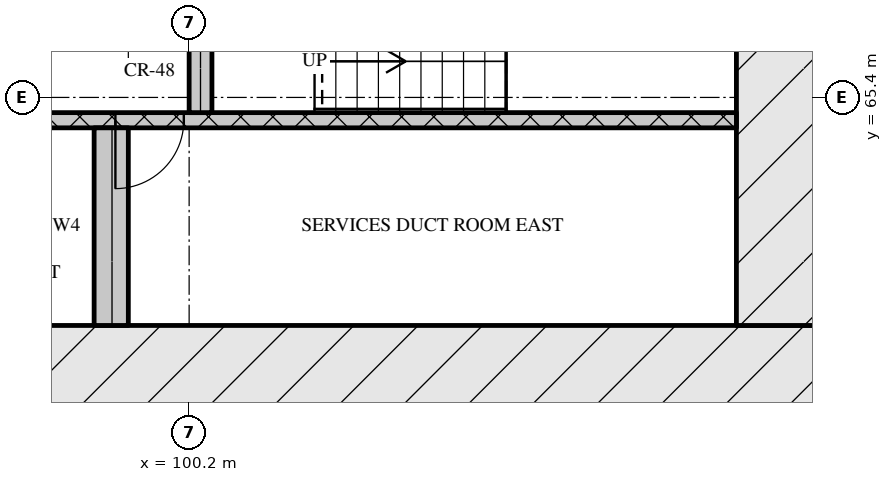
"""IFC4 building model, lengths in metres.
Left out: names, types, materials, properties, quantities, classifications, styles, units other than length and angle.
Written with IfcOpenShell. Run it as: python <this file> out.ifc"""

import sys

from ifc_helpers import new_model, si_unit, direction, frame, frame_2d, origin, place, context, subcontext, project, spatial, rectangle, extrude, element, fill, save


model = new_model("IFC4")
c1 = context("Model", 3, precision=1e-05, world=origin(), true_north=direction((0.0, 1.0)))
c2 = subcontext(c1, "Body", "Model", "MODEL_VIEW")
j1 = project(units=[si_unit("LENGTHUNIT", "METRE"), si_unit("PLANEANGLEUNIT", "RADIAN")], contexts=[c1])
p1 = place(None, origin())
s1 = spatial("IfcSite", under=j1, at=p1, CompositionType="ELEMENT")
p2 = place(p1, origin())
s2 = spatial("IfcBuilding", under=s1, at=p2, CompositionType="ELEMENT")
p3 = place(p2, frame((0.0, 0.0, 62.4)))
s3 = spatial("IfcBuildingStorey", under=s2, at=p3, CompositionType="ELEMENT", Elevation=62.4)
p4 = place(p3, frame((66.6, 61.8, 0.0), z_axis=(0.0, 0.0, 1.0), x_axis=(1.0, 0.0, 0.0)))
e1 = element("IfcWall", 1, at=p4, inside=s3, PredefinedType="SOLIDWALL", context=c2, shape_type="SweptSolid", body=[
    extrude(rectangle(XDim=42.0, YDim=1.2, at=frame_2d((21.0, 0.0))), origin(), (0.0, 0.0, 1.0), 3.32),
])
p5 = place(p4, frame((21.35, 0.0, 0.0)))
e2 = element("IfcOpeningElement", 2, at=p5, cuts=e1, PredefinedType="OPENING", context=c2, shape_type="SweptSolid", body=[
    extrude(rectangle(XDim=1.8, YDim=2.1, at=frame_2d((0.9, 1.05))), frame((0.0, 0.61, 0.0), z_axis=(0.0, -1.0, 0.0), x_axis=(1.0, 0.0, 0.0)), (0.0, 0.0, 1.0), 1.22),
])
p6 = place(p3, frame((108.0, 62.4, 0.0), z_axis=(0.0, 0.0, 1.0), x_axis=(0.0, 1.0, 0.0)))
e3 = element("IfcWall", 3, at=p6, inside=s3, PredefinedType="SOLIDWALL", context=c2, shape_type="SweptSolid", body=[
    extrude(rectangle(XDim=12.0, YDim=1.2, at=frame_2d((6.0, 0.0))), origin(), (0.0, 0.0, 1.0), 3.32),
])
p7 = place(p6, frame((6.45, 0.0, 0.0)))
e4 = element("IfcOpeningElement", 4, at=p7, cuts=e3, PredefinedType="OPENING", context=c2, shape_type="SweptSolid", body=[
    extrude(rectangle(XDim=1.2, YDim=2.1, at=frame_2d((0.6, 1.05))), frame((0.0, 0.61, 0.0), z_axis=(0.0, -1.0, 0.0), x_axis=(1.0, 0.0, 0.0)), (0.0, 0.0, 1.0), 1.22),
])
p8 = place(p3, frame((99.175, 62.4, 0.0), z_axis=(0.0, 0.0, 1.0), x_axis=(0.0, 1.0, 0.0)))
e5 = element("IfcWall", 5, at=p8, inside=s3, PredefinedType="SOLIDWALL", context=c2, shape_type="SweptSolid", body=[
    extrude(rectangle(XDim=2.6, YDim=0.45, at=frame_2d((1.3, 0.0))), origin(), (0.0, 0.0, 1.0), 3.32),
])
p9 = place(p3, frame((91.4, 65.1, 0.0), z_axis=(0.0, 0.0, 1.0), x_axis=(1.0, 0.0, 0.0)))
e6 = element("IfcWall", 6, at=p9, inside=s3, PredefinedType="SOLIDWALL", context=c2, shape_type="SweptSolid", body=[
    extrude(rectangle(XDim=16.0, YDim=0.2, at=frame_2d((8.0, 0.0))), origin(), (0.0, 0.0, 1.0), 3.32),
])
p10 = place(p9, frame((7.83, 0.0, 0.0)))
e7 = element("IfcOpeningElement", 7, at=p10, cuts=e6, PredefinedType="OPENING", context=c2, shape_type="SweptSolid", body=[
    extrude(rectangle(XDim=0.9, YDim=2.1, at=frame_2d((0.45, 1.05))), frame((0.0, 0.11, 0.0), z_axis=(0.0, -1.0, 0.0), x_axis=(1.0, 0.0, 0.0)), (0.0, 0.0, 1.0), 0.22),
])
p11 = place(p3, frame((100.35, 65.2, 0.0), z_axis=(0.0, 0.0, 1.0), x_axis=(0.0, 1.0, 0.0)))
e8 = element("IfcWall", 8, at=p11, inside=s3, PredefinedType="SOLIDWALL", context=c2, shape_type="SweptSolid", body=[
    extrude(rectangle(XDim=2.85, YDim=0.3, at=frame_2d((1.425, 0.0))), origin(), (0.0, 0.0, 1.0), 3.32),
])
p12 = place(p10, origin())
e9 = element("IfcDoor", 9, at=p12, inside=s3, OperationType="SINGLE_SWING_RIGHT", PredefinedType="DOOR", context=c2, shape_type="SweptSolid", body=[
    extrude(rectangle(XDim=0.9, YDim=2.1, at=frame_2d((0.45, 1.05))), frame((0.0, 0.025, 0.0), z_axis=(0.0, -1.0, 0.0), x_axis=(1.0, 0.0, 0.0)), (0.0, 0.0, 1.0), 0.05),
])
fill(e7, e9)
save(model, sys.argv[1])
